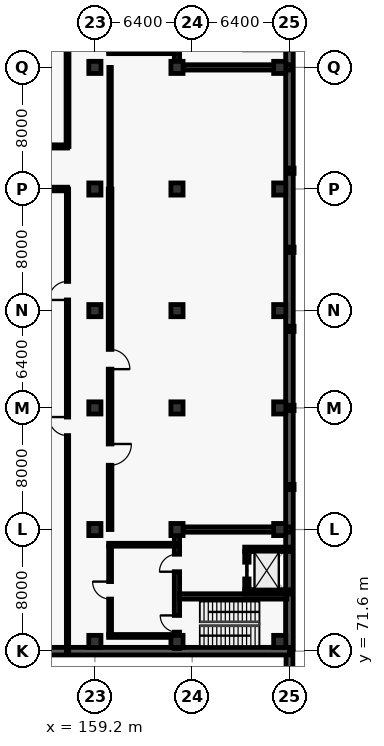
"""IFC4 building model, lengths in metres.
Left out: names, types, materials, properties, quantities, classifications, styles, units other than length and angle.
Written with IfcOpenShell. Run it as: python <this file> out.ifc"""

import sys

from ifc_helpers import new_model, si_unit, direction, frame, frame_2d, origin, origin_2d, place, context, subcontext, project, spatial, rectangle, extrude, element, fill, save


model = new_model("IFC4")
c1 = context("Model", 3, precision=1e-05, world=origin(), true_north=direction((0.0, 1.0)))
c2 = subcontext(c1, "Body", "Model", "MODEL_VIEW")
j1 = project(units=[si_unit("LENGTHUNIT", "METRE"), si_unit("PLANEANGLEUNIT", "RADIAN")], contexts=[c1])
p1 = place(None, origin())
s1 = spatial("IfcSite", under=j1, at=p1, CompositionType="ELEMENT")
p2 = place(p1, origin())
s2 = spatial("IfcBuilding", under=s1, at=p2, CompositionType="ELEMENT")
p3 = place(p2, frame((0.0, 0.0, -4.8)))
s3 = spatial("IfcBuildingStorey", under=s2, at=p3, CompositionType="ELEMENT", Elevation=-4.8)
for number, where, z_axis, x_axis in (
    (1, (159.2, 72.24, 0.0), (0.0, 0.0, 1.0), (1.0, 0.0, 0.0)),
    (2, (159.2, 79.6, 0.0), (0.0, 0.0, 1.0), (1.0, 0.0, 0.0)),
    (3, (159.2, 87.6, 0.0), (0.0, 0.0, 1.0), (1.0, 0.0, 0.0)),
    (4, (159.2, 94.0, 0.0), (0.0, 0.0, 1.0), (1.0, 0.0, 0.0)),
    (5, (159.2, 102.0, 0.0), (0.0, 0.0, 1.0), (1.0, 0.0, 0.0)),
    (6, (159.2, 110.0, 0.0), (0.0, 0.0, 1.0), (1.0, 0.0, 0.0)),
    (7, (164.6, 72.24, 0.0), (0.0, 0.0, 1.0), (1.0, 0.0, 0.0)),
    (8, (164.6, 79.6, 0.0), (0.0, 0.0, 1.0), (1.0, 0.0, 0.0)),
    (9, (164.6, 87.6, 0.0), (0.0, 0.0, 1.0), (1.0, 0.0, 0.0)),
    (10, (164.6, 94.0, 0.0), (0.0, 0.0, 1.0), (1.0, 0.0, 0.0)),
    (11, (164.6, 102.0, 0.0), (0.0, 0.0, 1.0), (1.0, 0.0, 0.0)),
    (12, (164.6, 110.0, 0.0), (0.0, 0.0, 1.0), (1.0, 0.0, 0.0)),
    (13, (171.36, 72.24, 0.0), (0.0, 0.0, 1.0), (1.0, 0.0, 0.0)),
    (14, (171.36, 79.6, 0.0), (0.0, 0.0, 1.0), (1.0, 0.0, 0.0)),
    (15, (171.36, 87.6, 0.0), (0.0, 0.0, 1.0), (1.0, 0.0, 0.0)),
    (16, (171.36, 94.0, 0.0), (0.0, 0.0, 1.0), (1.0, 0.0, 0.0)),
    (17, (171.36, 102.0, 0.0), (0.0, 0.0, 1.0), (1.0, 0.0, 0.0)),
    (18, (171.36, 110.0, 0.0), (0.0, 0.0, 1.0), (1.0, 0.0, 0.0)),
):
    element("IfcColumn", number, at=place(p3, frame(where, z_axis=z_axis, x_axis=x_axis)), inside=s3, PredefinedType="COLUMN", context=c2, shape_type="SweptSolid", body=[
        extrude(rectangle(XDim=0.8, YDim=0.8, at=origin_2d()), origin(), (0.0, 0.0, 1.0), 4.8),
    ])
for number, where, z_axis, x_axis in (
    (19, (172.08, 82.4, -0.48), (0.0, 0.0, 1.0), (1.0, 0.0, 0.0)),
    (20, (172.08, 87.6, -0.48), (0.0, 0.0, 1.0), (1.0, 0.0, 0.0)),
    (21, (172.08, 92.8, -0.48), (0.0, 0.0, 1.0), (1.0, 0.0, 0.0)),
    (22, (172.08, 98.0, -0.48), (0.0, 0.0, 1.0), (1.0, 0.0, 0.0)),
    (23, (172.08, 103.2, -0.48), (0.0, 0.0, 1.0), (1.0, 0.0, 0.0)),
):
    element("IfcColumn", number, at=place(p3, frame(where, z_axis=z_axis, x_axis=x_axis)), inside=s3, PredefinedType="PILASTER", context=c2, shape_type="SweptSolid", body=[
        extrude(rectangle(XDim=0.35, YDim=0.45, at=origin_2d()), origin(), (0.0, 0.0, 1.0), 5.28),
    ])
p4 = place(p3, frame((172.0, 63.62, 0.0), z_axis=(0.0, 0.0, 1.0), x_axis=(0.0, 1.0, 0.0)))
e24 = element("IfcWall", 24, at=p4, inside=s3, PredefinedType="USERDEFINED", context=c2, shape_type="SweptSolid", body=[
    extrude(rectangle(XDim=7.96, YDim=0.45, at=frame_2d((3.98, 0.0))), origin(), (0.0, 0.0, 1.0), 4.53),
])
p5 = place(p3, frame((172.0, 117.86, 0.0), z_axis=(0.0, 0.0, 1.0), x_axis=(0.0, -1.0, 0.0)))
e25 = element("IfcWall", 25, at=p5, inside=s3, PredefinedType="USERDEFINED", context=c2, shape_type="SweptSolid", body=[
    extrude(rectangle(XDim=46.12, YDim=0.5, at=frame_2d((23.06, 0.0))), origin(), (0.0, 0.0, 1.0), 4.5),
])
p6 = place(p3, frame((172.0, 71.6, 0.0), z_axis=(0.0, 0.0, 1.0), x_axis=(-1.0, 0.0, 0.0)))
e26 = element("IfcWall", 26, at=p6, inside=s3, PredefinedType="USERDEFINED", context=c2, shape_type="SweptSolid", body=[
    extrude(rectangle(XDim=32.4, YDim=0.5, at=frame_2d((16.2, 0.0))), origin(), (0.0, 0.0, 1.0), 4.5),
])
p7 = place(p3, frame((165.002, 79.6, 0.0), z_axis=(0.0, 0.0, 1.0), x_axis=(1.0, 0.0, 0.0)))
e27 = element("IfcWall", 27, at=p7, inside=s3, PredefinedType="SHEAR", context=c2, shape_type="SweptSolid", body=[
    extrude(rectangle(XDim=7.173, YDim=0.35, at=frame_2d((3.586, 0.0))), origin(), (0.0, 0.0, 1.0), 4.5),
])
p8 = place(p3, frame((164.6, 71.775, 0.0), z_axis=(0.0, 0.0, 1.0), x_axis=(0.0, 1.0, 0.0)))
e28 = element("IfcWall", 28, at=p8, inside=s3, PredefinedType="SHEAR", context=c2, shape_type="SweptSolid", body=[
    extrude(rectangle(XDim=7.423, YDim=0.35, at=frame_2d((3.711, 0.0))), origin(), (0.0, 0.0, 1.0), 4.5),
])
p9 = place(p8, frame((1.075, 0.0, 0.0)))
e29 = element("IfcOpeningElement", 29, at=p9, cuts=e28, PredefinedType="OPENING", context=c2, shape_type="SweptSolid", body=[
    extrude(rectangle(XDim=1.1, YDim=2.15, at=frame_2d((0.55, 1.075))), frame((0.0, 0.185, 0.0), z_axis=(0.0, -1.0, 0.0), x_axis=(1.0, 0.0, 0.0)), (0.0, 0.0, 1.0), 0.37),
])
p10 = place(p8, frame((5.05, 0.0, 0.0)))
e30 = element("IfcOpeningElement", 30, at=p10, cuts=e28, PredefinedType="OPENING", context=c2, shape_type="SweptSolid", body=[
    extrude(rectangle(XDim=1.15, YDim=2.2, at=frame_2d((0.575, 1.1))), frame((0.0, 0.185, 0.0), z_axis=(0.0, -1.0, 0.0), x_axis=(1.0, 0.0, 0.0)), (0.0, 0.0, 1.0), 0.37),
])
p11 = place(p3, frame((164.775, 75.2, 0.0), z_axis=(0.0, 0.0, 1.0), x_axis=(1.0, 0.0, 0.0)))
e31 = element("IfcWall", 31, at=p11, inside=s3, PredefinedType="SHEAR", context=c2, shape_type="SweptSolid", body=[
    extrude(rectangle(XDim=7.05, YDim=0.35, at=frame_2d((3.525, 0.0))), origin(), (0.0, 0.0, 1.0), 4.5),
])
for number, where, z_axis, x_axis in (
    (32, (169.055, 75.5, 0.0), (0.0, 0.0, 1.0), (1.0, 0.0, 0.0)),
    (33, (169.055, 78.3, 0.0), (0.0, 0.0, 1.0), (1.0, 0.0, 0.0)),
):
    element("IfcWall", number, at=place(p3, frame(where, z_axis=z_axis, x_axis=x_axis)), inside=s3, PredefinedType="SHEAR", context=c2, shape_type="SweptSolid", body=[
        extrude(rectangle(XDim=2.89, YDim=0.29, at=frame_2d((1.445, 0.0))), origin(), (0.0, 0.0, 1.0), 4.5),
    ])
p12 = place(p3, frame((169.2, 75.645, 0.0), z_axis=(0.0, 0.0, 1.0), x_axis=(0.0, 1.0, 0.0)))
e34 = element("IfcWall", 34, at=p12, inside=s3, PredefinedType="SHEAR", context=c2, shape_type="SweptSolid", body=[
    extrude(rectangle(XDim=2.51, YDim=0.29, at=frame_2d((1.255, 0.0))), origin(), (0.0, 0.0, 1.0), 4.5),
])
p13 = place(p12, frame((0.705, 0.0, 0.0)))
e35 = element("IfcOpeningElement", 35, at=p13, cuts=e34, PredefinedType="OPENING", context=c2, shape_type="SweptSolid", body=[
    extrude(rectangle(XDim=1.1, YDim=2.15, at=frame_2d((0.55, 1.075))), frame((0.0, 0.155, 0.0), z_axis=(0.0, -1.0, 0.0), x_axis=(1.0, 0.0, 0.0)), (0.0, 0.0, 1.0), 0.31),
])
p14 = place(p3, frame((160.105, 72.6, 0.0), z_axis=(0.0, 0.0, 1.0), x_axis=(1.0, 0.0, 0.0)))
e36 = element("IfcWall", 36, at=p14, inside=s3, PredefinedType="PARTITIONING", context=c2, shape_type="SweptSolid", body=[
    extrude(rectangle(XDim=4.093, YDim=0.19, at=frame_2d((2.046, 0.0))), origin(), (0.0, 0.0, 1.0), 3.85),
])
p15 = place(p3, frame((160.105, 78.6, 0.0), z_axis=(0.0, 0.0, 1.0), x_axis=(1.0, 0.0, 0.0)))
e37 = element("IfcWall", 37, at=p15, inside=s3, PredefinedType="PARTITIONING", context=c2, shape_type="SweptSolid", body=[
    extrude(rectangle(XDim=4.495, YDim=0.19, at=frame_2d((2.248, 0.0))), origin(), (0.0, 0.0, 1.0), 4.5),
])
p16 = place(p3, frame((160.2, 72.695, 0.0), z_axis=(0.0, 0.0, 1.0), x_axis=(0.0, 1.0, 0.0)))
e38 = element("IfcWall", 38, at=p16, inside=s3, PredefinedType="PARTITIONING", context=c2, shape_type="SweptSolid", body=[
    extrude(rectangle(XDim=5.81, YDim=0.19, at=frame_2d((2.905, 0.0))), origin(), (0.0, 0.0, 1.0), 4.5),
])
p17 = place(p16, frame((2.33, 0.0, 0.0)))
e39 = element("IfcOpeningElement", 39, at=p17, cuts=e38, PredefinedType="OPENING", context=c2, shape_type="SweptSolid", body=[
    extrude(rectangle(XDim=1.15, YDim=2.2, at=frame_2d((0.575, 1.1))), frame((0.0, 0.105, 0.0), z_axis=(0.0, -1.0, 0.0), x_axis=(1.0, 0.0, 0.0)), (0.0, 0.0, 1.0), 0.21),
])
p18 = place(p3, frame((165.002, 110.0, 0.0), z_axis=(0.0, 0.0, 1.0), x_axis=(1.0, 0.0, 0.0)))
e40 = element("IfcWall", 40, at=p18, inside=s3, PredefinedType="SHEAR", context=c2, shape_type="SweptSolid", body=[
    extrude(rectangle(XDim=7.173, YDim=0.35, at=frame_2d((3.586, 0.0))), origin(), (0.0, 0.0, 1.0), 4.5),
])
p19 = place(p3, frame((164.6, 110.402, 0.0), z_axis=(0.0, 0.0, 1.0), x_axis=(0.0, 1.0, 0.0)))
e41 = element("IfcWall", 41, at=p19, inside=s3, PredefinedType="SHEAR", context=c2, shape_type="SweptSolid", body=[
    extrude(rectangle(XDim=7.423, YDim=0.35, at=frame_2d((3.711, 0.0))), origin(), (0.0, 0.0, 1.0), 4.5),
])
p20 = place(p19, frame((5.248, 0.0, 0.0)))
e42 = element("IfcOpeningElement", 42, at=p20, cuts=e41, PredefinedType="OPENING", context=c2, shape_type="SweptSolid", body=[
    extrude(rectangle(XDim=1.1, YDim=2.15, at=frame_2d((0.55, 1.075))), frame((0.0, 0.185, 0.0), z_axis=(0.0, -1.0, 0.0), x_axis=(1.0, 0.0, 0.0)), (0.0, 0.0, 1.0), 0.37),
])
p21 = place(p19, frame((1.223, 0.0, 0.0)))
e43 = element("IfcOpeningElement", 43, at=p21, cuts=e41, PredefinedType="OPENING", context=c2, shape_type="SweptSolid", body=[
    extrude(rectangle(XDim=1.15, YDim=2.2, at=frame_2d((0.575, 1.1))), frame((0.0, 0.185, 0.0), z_axis=(0.0, -1.0, 0.0), x_axis=(1.0, 0.0, 0.0)), (0.0, 0.0, 1.0), 0.37),
])
p22 = place(p3, frame((160.105, 111.0, 0.0), z_axis=(0.0, 0.0, 1.0), x_axis=(1.0, 0.0, 0.0)))
e44 = element("IfcWall", 44, at=p22, inside=s3, PredefinedType="PARTITIONING", context=c2, shape_type="SweptSolid", body=[
    extrude(rectangle(XDim=4.495, YDim=0.19, at=frame_2d((2.248, 0.0))), origin(), (0.0, 0.0, 1.0), 4.5),
])
p23 = place(p3, frame((157.4, 102.0, 0.0), z_axis=(0.0, 0.0, 1.0), x_axis=(-1.0, 0.0, 0.0)))
e45 = element("IfcWall", 45, at=p23, inside=s3, PredefinedType="PARTITIONING", context=c2, shape_type="SweptSolid", body=[
    extrude(rectangle(XDim=17.8, YDim=0.24, at=frame_2d((8.9, 0.0))), origin(), (0.0, 0.0, 1.0), 3.85),
])
p24 = place(p3, frame((139.6, 104.8, 0.0), z_axis=(0.0, 0.0, 1.0), x_axis=(1.0, 0.0, 0.0)))
e46 = element("IfcWall", 46, at=p24, inside=s3, PredefinedType="PARTITIONING", context=c2, shape_type="SweptSolid", body=[
    extrude(rectangle(XDim=17.8, YDim=0.21, at=frame_2d((8.9, 0.0))), origin(), (0.0, 0.0, 1.0), 4.5),
])
p25 = place(p24, frame((8.27, 0.0, 0.0)))
e47 = element("IfcOpeningElement", 47, at=p25, cuts=e46, PredefinedType="OPENING", context=c2, shape_type="SweptSolid", body=[
    extrude(rectangle(XDim=1.26, YDim=2.2, at=frame_2d((0.63, 1.1))), frame((0.0, 0.115, 0.0), z_axis=(0.0, -1.0, 0.0), x_axis=(1.0, 0.0, 0.0)), (0.0, 0.0, 1.0), 0.23),
])
p26 = place(p24, frame((13.184, 0.0, 0.0)))
e48 = element("IfcOpeningElement", 48, at=p26, cuts=e46, PredefinedType="OPENING", context=c2, shape_type="SweptSolid", body=[
    extrude(rectangle(XDim=1.4, YDim=2.25, at=frame_2d((0.7, 1.125))), frame((0.0, 0.115, 0.0), z_axis=(0.0, -1.0, 0.0), x_axis=(1.0, 0.0, 0.0)), (0.0, 0.0, 1.0), 0.23),
])
p27 = place(p3, frame((157.4, 104.8, 0.0), z_axis=(0.0, 0.0, 1.0), x_axis=(0.0, 1.0, 0.0)))
e49 = element("IfcWall", 49, at=p27, inside=s3, PredefinedType="PARTITIONING", context=c2, shape_type="SweptSolid", body=[
    extrude(rectangle(XDim=13.2, YDim=0.19, at=frame_2d((6.6, 0.0))), origin(), (0.0, 0.0, 1.0), 4.5),
])
p28 = place(p3, frame((160.2, 110.0, 0.0), z_axis=(0.0, 0.0, 1.0), x_axis=(0.0, -1.0, 0.0)))
e50 = element("IfcWall", 50, at=p28, inside=s3, PredefinedType="PARTITIONING", context=c2, shape_type="SweptSolid", body=[
    extrude(rectangle(XDim=8.0, YDim=0.165, at=frame_2d((4.0, 0.0))), origin(), (0.0, 0.0, 1.0), 4.5),
])
p29 = place(p3, frame((157.4, 71.6, 0.0), z_axis=(0.0, 0.0, 1.0), x_axis=(0.0, 1.0, 0.0)))
e51 = element("IfcWall", 51, at=p29, inside=s3, PredefinedType="PARTITIONING", context=c2, shape_type="SweptSolid", body=[
    extrude(rectangle(XDim=30.4, YDim=0.15, at=frame_2d((15.2, 0.0))), origin(), (0.0, 0.0, 1.0), 4.5),
])
p30 = place(p29, frame((14.18, 0.0, 0.0)))
e52 = element("IfcOpeningElement", 52, at=p30, cuts=e51, PredefinedType="OPENING", context=c2, shape_type="SweptSolid", body=[
    extrude(rectangle(XDim=1.22, YDim=2.2, at=frame_2d((0.61, 1.1))), frame((0.0, 0.085, 0.0), z_axis=(0.0, -1.0, 0.0), x_axis=(1.0, 0.0, 0.0)), (0.0, 0.0, 1.0), 0.17),
])
p31 = place(p29, frame((23.102, 0.0, 0.0)))
e53 = element("IfcOpeningElement", 53, at=p31, cuts=e51, PredefinedType="OPENING", context=c2, shape_type="SweptSolid", body=[
    extrude(rectangle(XDim=1.22, YDim=2.2, at=frame_2d((0.61, 1.1))), frame((0.0, 0.085, 0.0), z_axis=(0.0, -1.0, 0.0), x_axis=(1.0, 0.0, 0.0)), (0.0, 0.0, 1.0), 0.17),
])
p32 = place(p3, frame((160.2, 102.0, 0.0), z_axis=(0.0, 0.0, 1.0), x_axis=(0.0, -1.0, 0.0)))
e54 = element("IfcWall", 54, at=p32, inside=s3, PredefinedType="PARTITIONING", context=c2, shape_type="SweptSolid", body=[
    extrude(rectangle(XDim=22.4, YDim=0.24, at=frame_2d((11.2, 0.0))), origin(), (0.0, 0.0, 1.0), 4.5),
])
p33 = place(p32, frame((10.55, 0.0, 0.0)))
e55 = element("IfcOpeningElement", 55, at=p33, cuts=e54, PredefinedType="OPENING", context=c2, shape_type="SweptSolid", body=[
    extrude(rectangle(XDim=1.3, YDim=2.2, at=frame_2d((0.65, 1.1))), frame((0.0, 0.13, 0.0), z_axis=(0.0, -1.0, 0.0), x_axis=(1.0, 0.0, 0.0)), (0.0, 0.0, 1.0), 0.26),
])
p34 = place(p32, frame((16.772, 0.0, 0.0)))
e56 = element("IfcOpeningElement", 56, at=p34, cuts=e54, PredefinedType="OPENING", context=c2, shape_type="SweptSolid", body=[
    extrude(rectangle(XDim=1.4, YDim=2.25, at=frame_2d((0.7, 1.125))), frame((0.0, 0.13, 0.0), z_axis=(0.0, -1.0, 0.0), x_axis=(1.0, 0.0, 0.0)), (0.0, 0.0, 1.0), 0.26),
])
p35 = place(p9, origin())
e57 = element("IfcDoor", 57, at=p35, inside=s3, OperationType="SINGLE_SWING_RIGHT", PredefinedType="DOOR", context=c2, shape_type="SweptSolid", body=[
    extrude(rectangle(XDim=1.1, YDim=2.15, at=frame_2d((0.55, 1.075))), frame((0.0, 0.025, 0.0), z_axis=(0.0, -1.0, 0.0), x_axis=(1.0, 0.0, 0.0)), (0.0, 0.0, 1.0), 0.05),
])
fill(e29, e57)
p36 = place(p10, origin())
e58 = element("IfcDoor", 58, at=p36, inside=s3, OperationType="SINGLE_SWING_LEFT", PredefinedType="DOOR", context=c2, shape_type="SweptSolid", body=[
    extrude(rectangle(XDim=1.15, YDim=2.2, at=frame_2d((0.575, 1.1))), frame((0.0, 0.025, 0.0), z_axis=(0.0, -1.0, 0.0), x_axis=(1.0, 0.0, 0.0)), (0.0, 0.0, 1.0), 0.05),
])
fill(e30, e58)
p37 = place(p13, origin())
e59 = element("IfcDoor", 59, at=p37, inside=s3, OperationType="SLIDING_TO_LEFT", PredefinedType="DOOR", context=c2, shape_type="SweptSolid", body=[
    extrude(rectangle(XDim=1.1, YDim=2.15, at=frame_2d((0.55, 1.075))), frame((0.0, 0.025, 0.0), z_axis=(0.0, -1.0, 0.0), x_axis=(1.0, 0.0, 0.0)), (0.0, 0.0, 1.0), 0.05),
])
fill(e35, e59)
p38 = place(p17, origin())
e60 = element("IfcDoor", 60, at=p38, inside=s3, OperationType="SINGLE_SWING_RIGHT", PredefinedType="DOOR", context=c2, shape_type="SweptSolid", body=[
    extrude(rectangle(XDim=1.15, YDim=2.2, at=frame_2d((0.575, 1.1))), frame((0.0, 0.025, 0.0), z_axis=(0.0, -1.0, 0.0), x_axis=(1.0, 0.0, 0.0)), (0.0, 0.0, 1.0), 0.05),
])
fill(e39, e60)
p39 = place(p30, origin())
e61 = element("IfcDoor", 61, at=p39, inside=s3, OperationType="SINGLE_SWING_RIGHT", PredefinedType="DOOR", context=c2, shape_type="SweptSolid", body=[
    extrude(rectangle(XDim=1.22, YDim=2.2, at=frame_2d((0.61, 1.1))), frame((0.0, 0.025, 0.0), z_axis=(0.0, -1.0, 0.0), x_axis=(1.0, 0.0, 0.0)), (0.0, 0.0, 1.0), 0.05),
])
fill(e52, e61)
p40 = place(p31, origin())
e62 = element("IfcDoor", 62, at=p40, inside=s3, OperationType="SINGLE_SWING_LEFT", PredefinedType="DOOR", context=c2, shape_type="SweptSolid", body=[
    extrude(rectangle(XDim=1.22, YDim=2.2, at=frame_2d((0.61, 1.1))), frame((0.0, 0.025, 0.0), z_axis=(0.0, -1.0, 0.0), x_axis=(1.0, 0.0, 0.0)), (0.0, 0.0, 1.0), 0.05),
])
fill(e53, e62)
p41 = place(p33, origin())
e63 = element("IfcDoor", 63, at=p41, inside=s3, OperationType="SINGLE_SWING_RIGHT", PredefinedType="DOOR", context=c2, shape_type="SweptSolid", body=[
    extrude(rectangle(XDim=1.3, YDim=2.2, at=frame_2d((0.65, 1.1))), frame((0.0, 0.025, 0.0), z_axis=(0.0, -1.0, 0.0), x_axis=(1.0, 0.0, 0.0)), (0.0, 0.0, 1.0), 0.05),
])
fill(e55, e63)
p42 = place(p34, origin())
e64 = element("IfcDoor", 64, at=p42, inside=s3, OperationType="SINGLE_SWING_LEFT", PredefinedType="DOOR", context=c2, shape_type="SweptSolid", body=[
    extrude(rectangle(XDim=1.4, YDim=2.25, at=frame_2d((0.7, 1.125))), frame((0.0, 0.025, 0.0), z_axis=(0.0, -1.0, 0.0), x_axis=(1.0, 0.0, 0.0)), (0.0, 0.0, 1.0), 0.05),
])
fill(e56, e64)
save(model, sys.argv[1])
